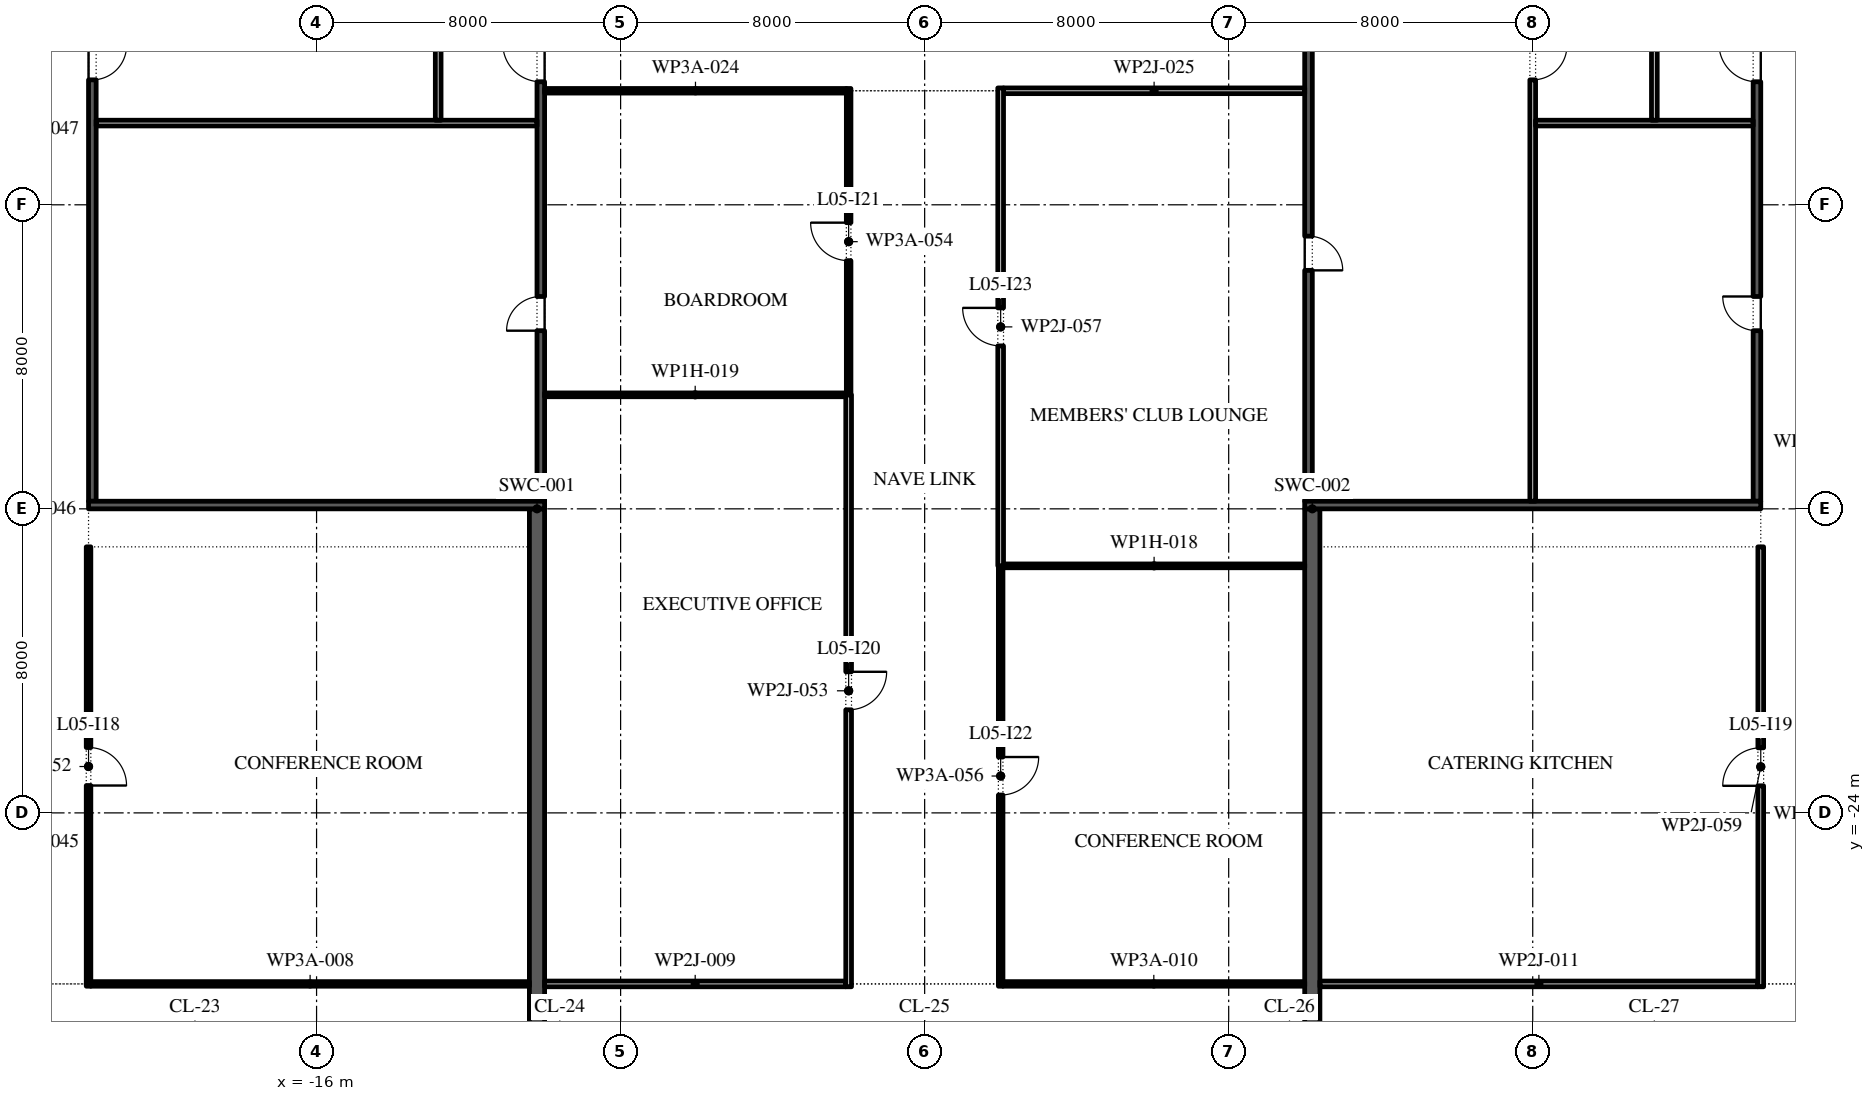
"""IFC4 building model, lengths in metres.
Left out: names, types, materials, properties, quantities, classifications, styles, units other than length and angle.
Written with IfcOpenShell. Run it as: python <this file> out.ifc"""

import sys

from ifc_helpers import new_model, si_unit, direction, frame, frame_2d, origin, place, context, subcontext, project, spatial, rectangle, extrude, element, fill, save


model = new_model("IFC4")
c1 = context("Model", 3, precision=1e-05, world=origin(), true_north=direction((0.0, 1.0)))
c2 = subcontext(c1, "Body", "Model", "MODEL_VIEW")
j1 = project(units=[si_unit("LENGTHUNIT", "METRE"), si_unit("PLANEANGLEUNIT", "RADIAN")], contexts=[c1])
p1 = place(None, origin())
s1 = spatial("IfcSite", under=j1, at=p1, CompositionType="ELEMENT")
p2 = place(p1, origin())
s2 = spatial("IfcBuilding", under=s1, at=p2, CompositionType="ELEMENT")
p3 = place(p2, frame((0.0, 0.0, 28.8)))
s3 = spatial("IfcBuildingStorey", under=s2, at=p3, CompositionType="ELEMENT", Elevation=28.8)
for number, where, z_axis, x_axis in (
    (1, (-10.2, -31.0, 0.0), (0.0, 0.0, 1.0), (0.0, 1.0, 0.0)),
    (2, (10.2, -31.0, 0.0), (0.0, 0.0, 1.0), (0.0, 1.0, 0.0)),
):
    element("IfcWall", number, at=place(p3, frame(where, z_axis=z_axis, x_axis=x_axis)), inside=s3, PredefinedType="SHEAR", context=c2, shape_type="SweptSolid", body=[
        extrude(rectangle(XDim=15.0, YDim=0.4, at=frame_2d((7.5, 0.0))), origin(), (0.0, 0.0, 1.0), 4.35),
    ])
p4 = place(p3, frame((-21.9, -15.8, 0.0), z_axis=(0.0, 0.0, 1.0), x_axis=(0.0, 1.0, 0.0)))
e3 = element("IfcWall", 3, at=p4, inside=s3, PredefinedType="SHEAR", context=c2, shape_type="SweptSolid", body=[
    extrude(rectangle(XDim=13.05, YDim=0.2, at=frame_2d((6.525, 0.0))), origin(), (0.0, 0.0, 1.0), 4.35),
])
p5 = place(p4, frame((11.087, 0.0, 0.0)))
e4 = element("IfcOpeningElement", 4, at=p5, cuts=e3, PredefinedType="OPENING", context=c2, shape_type="SweptSolid", body=[
    extrude(rectangle(XDim=0.9, YDim=2.1, at=frame_2d((0.45, 1.05))), frame((0.0, 0.11, 0.0), z_axis=(0.0, -1.0, 0.0), x_axis=(1.0, 0.0, 0.0)), (0.0, 0.0, 1.0), 0.22),
])
p6 = place(p3, frame((-10.1, -15.8, 0.0), z_axis=(0.0, 0.0, 1.0), x_axis=(0.0, 1.0, 0.0)))
e5 = element("IfcWall", 5, at=p6, inside=s3, PredefinedType="SHEAR", context=c2, shape_type="SweptSolid", body=[
    extrude(rectangle(XDim=13.05, YDim=0.2, at=frame_2d((6.525, 0.0))), origin(), (0.0, 0.0, 1.0), 4.35),
])
p7 = place(p6, frame((4.488, 0.0, 0.0)))
e6 = element("IfcOpeningElement", 6, at=p7, cuts=e5, PredefinedType="OPENING", context=c2, shape_type="SweptSolid", body=[
    extrude(rectangle(XDim=0.9, YDim=2.1, at=frame_2d((0.45, 1.05))), frame((0.0, 0.11, 0.0), z_axis=(0.0, -1.0, 0.0), x_axis=(1.0, 0.0, 0.0)), (0.0, 0.0, 1.0), 0.22),
])
p8 = place(p6, frame((11.038, 0.0, 0.0)))
e7 = element("IfcOpeningElement", 7, at=p8, cuts=e5, PredefinedType="OPENING", context=c2, shape_type="SweptSolid", body=[
    extrude(rectangle(XDim=1.0, YDim=2.1, at=frame_2d((0.5, 1.05))), frame((0.0, 0.11, 0.0), z_axis=(0.0, -1.0, 0.0), x_axis=(1.0, 0.0, 0.0)), (0.0, 0.0, 1.0), 0.22),
])
p9 = place(p3, frame((-22.0, -15.9, 0.0), z_axis=(0.0, 0.0, 1.0), x_axis=(1.0, 0.0, 0.0)))
e8 = element("IfcWall", 8, at=p9, inside=s3, PredefinedType="SHEAR", context=c2, shape_type="SweptSolid", body=[
    extrude(rectangle(XDim=12.0, YDim=0.2, at=frame_2d((6.0, 0.0))), origin(), (0.0, 0.0, 1.0), 4.35),
])
p10 = place(p3, frame((-21.8, -5.85, 0.0), z_axis=(0.0, 0.0, 1.0), x_axis=(1.0, 0.0, 0.0)))
e9 = element("IfcWall", 9, at=p10, inside=s3, PredefinedType="PARTITIONING", context=c2, shape_type="SweptSolid", body=[
    extrude(rectangle(XDim=11.6, YDim=0.15, at=frame_2d((5.8, 0.0))), origin(), (0.0, 0.0, 1.0), 4.35),
])
p11 = place(p3, frame((-12.8, -5.775, 0.0), z_axis=(0.0, 0.0, 1.0), x_axis=(0.0, 1.0, 0.0)))
e10 = element("IfcWall", 10, at=p11, inside=s3, PredefinedType="PARTITIONING", context=c2, shape_type="SweptSolid", body=[
    extrude(rectangle(XDim=3.025, YDim=0.15, at=frame_2d((1.512, 0.0))), origin(), (0.0, 0.0, 1.0), 4.35),
])
p12 = place(p3, frame((21.9, -15.8, 0.0), z_axis=(0.0, 0.0, 1.0), x_axis=(0.0, 1.0, 0.0)))
e11 = element("IfcWall", 11, at=p12, inside=s3, PredefinedType="SHEAR", context=c2, shape_type="SweptSolid", body=[
    extrude(rectangle(XDim=13.05, YDim=0.2, at=frame_2d((6.525, 0.0))), origin(), (0.0, 0.0, 1.0), 4.35),
])
p13 = place(p12, frame((4.488, 0.0, 0.0)))
e12 = element("IfcOpeningElement", 12, at=p13, cuts=e11, PredefinedType="OPENING", context=c2, shape_type="SweptSolid", body=[
    extrude(rectangle(XDim=0.9, YDim=2.1, at=frame_2d((0.45, 1.05))), frame((0.0, 0.11, 0.0), z_axis=(0.0, -1.0, 0.0), x_axis=(1.0, 0.0, 0.0)), (0.0, 0.0, 1.0), 0.22),
])
p14 = place(p12, frame((11.038, 0.0, 0.0)))
e13 = element("IfcOpeningElement", 13, at=p14, cuts=e11, PredefinedType="OPENING", context=c2, shape_type="SweptSolid", body=[
    extrude(rectangle(XDim=1.0, YDim=2.1, at=frame_2d((0.5, 1.05))), frame((0.0, 0.11, 0.0), z_axis=(0.0, -1.0, 0.0), x_axis=(1.0, 0.0, 0.0)), (0.0, 0.0, 1.0), 0.22),
])
p15 = place(p3, frame((10.1, -15.8, 0.0), z_axis=(0.0, 0.0, 1.0), x_axis=(0.0, 1.0, 0.0)))
e14 = element("IfcWall", 14, at=p15, inside=s3, PredefinedType="SHEAR", context=c2, shape_type="SweptSolid", body=[
    extrude(rectangle(XDim=13.05, YDim=0.2, at=frame_2d((6.525, 0.0))), origin(), (0.0, 0.0, 1.0), 4.35),
])
p16 = place(p15, frame((6.075, 0.0, 0.0)))
e15 = element("IfcOpeningElement", 15, at=p16, cuts=e14, PredefinedType="OPENING", context=c2, shape_type="SweptSolid", body=[
    extrude(rectangle(XDim=0.9, YDim=2.1, at=frame_2d((0.45, 1.05))), frame((0.0, 0.11, 0.0), z_axis=(0.0, -1.0, 0.0), x_axis=(1.0, 0.0, 0.0)), (0.0, 0.0, 1.0), 0.22),
])
p17 = place(p3, frame((10.0, -15.9, 0.0), z_axis=(0.0, 0.0, 1.0), x_axis=(1.0, 0.0, 0.0)))
e16 = element("IfcWall", 16, at=p17, inside=s3, PredefinedType="SHEAR", context=c2, shape_type="SweptSolid", body=[
    extrude(rectangle(XDim=12.0, YDim=0.2, at=frame_2d((6.0, 0.0))), origin(), (0.0, 0.0, 1.0), 4.35),
])
p18 = place(p3, frame((16.0, -15.8, 0.0), z_axis=(0.0, 0.0, 1.0), x_axis=(0.0, 1.0, 0.0)))
e17 = element("IfcWall", 17, at=p18, inside=s3, PredefinedType="PARTITIONING", context=c2, shape_type="SweptSolid", body=[
    extrude(rectangle(XDim=13.05, YDim=0.15, at=frame_2d((6.525, 0.0))), origin(), (0.0, 0.0, 1.0), 4.35),
])
p19 = place(p18, frame((11.087, 0.0, 0.0)))
e18 = element("IfcOpeningElement", 18, at=p19, cuts=e17, PredefinedType="OPENING", context=c2, shape_type="SweptSolid", body=[
    extrude(rectangle(XDim=0.9, YDim=2.1, at=frame_2d((0.45, 1.05))), frame((0.0, 0.085, 0.0), z_axis=(0.0, -1.0, 0.0), x_axis=(1.0, 0.0, 0.0)), (0.0, 0.0, 1.0), 0.17),
])
p20 = place(p3, frame((16.075, -5.85, 0.0), z_axis=(0.0, 0.0, 1.0), x_axis=(1.0, 0.0, 0.0)))
e19 = element("IfcWall", 19, at=p20, inside=s3, PredefinedType="PARTITIONING", context=c2, shape_type="SweptSolid", body=[
    extrude(rectangle(XDim=5.725, YDim=0.15, at=frame_2d((2.863, 0.0))), origin(), (0.0, 0.0, 1.0), 4.35),
])
p21 = place(p3, frame((19.2, -5.775, 0.0), z_axis=(0.0, 0.0, 1.0), x_axis=(0.0, 1.0, 0.0)))
e20 = element("IfcWall", 20, at=p21, inside=s3, PredefinedType="PARTITIONING", context=c2, shape_type="SweptSolid", body=[
    extrude(rectangle(XDim=3.025, YDim=0.15, at=frame_2d((1.512, 0.0))), origin(), (0.0, 0.0, 1.0), 4.35),
])
p22 = place(p3, frame((-21.94, -28.5, 0.0), z_axis=(0.0, 0.0, 1.0), x_axis=(1.0, 0.0, 0.0)))
e21 = element("IfcWall", 21, at=p22, inside=s3, PredefinedType="PARTITIONING", context=c2, shape_type="SweptSolid", body=[
    extrude(rectangle(XDim=11.54, YDim=0.12, at=frame_2d((5.77, 0.0))), origin(), (0.0, 0.0, 1.0), 4.35),
])
p23 = place(p3, frame((-10.0, -28.5, 0.0), z_axis=(0.0, 0.0, 1.0), x_axis=(1.0, 0.0, 0.0)))
e22 = element("IfcWall", 22, at=p23, inside=s3, PredefinedType="PARTITIONING", context=c2, shape_type="SweptSolid", body=[
    extrude(rectangle(XDim=7.925, YDim=0.15, at=frame_2d((3.962, 0.0))), origin(), (0.0, 0.0, 1.0), 4.35),
])
p24 = place(p3, frame((2.06, -28.5, 0.0), z_axis=(0.0, 0.0, 1.0), x_axis=(1.0, 0.0, 0.0)))
e23 = element("IfcWall", 23, at=p24, inside=s3, PredefinedType="PARTITIONING", context=c2, shape_type="SweptSolid", body=[
    extrude(rectangle(XDim=7.94, YDim=0.12, at=frame_2d((3.97, 0.0))), origin(), (0.0, 0.0, 1.0), 4.35),
])
p25 = place(p3, frame((10.4, -28.5, 0.0), z_axis=(0.0, 0.0, 1.0), x_axis=(1.0, 0.0, 0.0)))
e24 = element("IfcWall", 24, at=p25, inside=s3, PredefinedType="PARTITIONING", context=c2, shape_type="SweptSolid", body=[
    extrude(rectangle(XDim=11.525, YDim=0.15, at=frame_2d((5.763, 0.0))), origin(), (0.0, 0.0, 1.0), 4.35),
])
for number, where, z_axis, x_axis in (
    (25, (2.075, -17.5, 0.0), (0.0, 0.0, 1.0), (1.0, 0.0, 0.0)),
    (26, (-10.0, -13.0, 0.0), (0.0, 0.0, 1.0), (1.0, 0.0, 0.0)),
):
    element("IfcWall", number, at=place(p3, frame(where, z_axis=z_axis, x_axis=x_axis)), inside=s3, PredefinedType="PARTITIONING", context=c2, shape_type="SweptSolid", body=[
        extrude(rectangle(XDim=7.925, YDim=0.1, at=frame_2d((3.962, 0.0))), origin(), (0.0, 0.0, 1.0), 4.35),
    ])
p26 = place(p3, frame((-10.0, -5.0, 0.0), z_axis=(0.0, 0.0, 1.0), x_axis=(1.0, 0.0, 0.0)))
e27 = element("IfcWall", 27, at=p26, inside=s3, PredefinedType="PARTITIONING", context=c2, shape_type="SweptSolid", body=[
    extrude(rectangle(XDim=7.94, YDim=0.12, at=frame_2d((3.97, 0.0))), origin(), (0.0, 0.0, 1.0), 4.35),
])
p27 = place(p3, frame((2.075, -5.0, 0.0), z_axis=(0.0, 0.0, 1.0), x_axis=(1.0, 0.0, 0.0)))
e28 = element("IfcWall", 28, at=p27, inside=s3, PredefinedType="PARTITIONING", context=c2, shape_type="SweptSolid", body=[
    extrude(rectangle(XDim=7.925, YDim=0.15, at=frame_2d((3.962, 0.0))), origin(), (0.0, 0.0, 1.0), 4.35),
])
p28 = place(p3, frame((-22.0, -28.56, 0.0), z_axis=(0.0, 0.0, 1.0), x_axis=(0.0, 1.0, 0.0)))
e29 = element("IfcWall", 29, at=p28, inside=s3, PredefinedType="PARTITIONING", context=c2, shape_type="SweptSolid", body=[
    extrude(rectangle(XDim=11.56, YDim=0.12, at=frame_2d((5.78, 0.0))), origin(), (0.0, 0.0, 1.0), 4.35),
])
p29 = place(p28, frame((5.28, 0.0, 0.0)))
e30 = element("IfcOpeningElement", 30, at=p29, cuts=e29, PredefinedType="OPENING", context=c2, shape_type="SweptSolid", body=[
    extrude(rectangle(XDim=1.0, YDim=2.1, at=frame_2d((0.5, 1.05))), frame((0.0, 0.07, 0.0), z_axis=(0.0, -1.0, 0.0), x_axis=(1.0, 0.0, 0.0)), (0.0, 0.0, 1.0), 0.14),
])
p30 = place(p3, frame((-2.0, -28.575, 0.0), z_axis=(0.0, 0.0, 1.0), x_axis=(0.0, 1.0, 0.0)))
e31 = element("IfcWall", 31, at=p30, inside=s3, PredefinedType="PARTITIONING", context=c2, shape_type="SweptSolid", body=[
    extrude(rectangle(XDim=15.575, YDim=0.15, at=frame_2d((7.788, 0.0))), origin(), (0.0, 0.0, 1.0), 4.35),
])
p31 = place(p30, frame((7.288, 0.0, 0.0)))
e32 = element("IfcOpeningElement", 32, at=p31, cuts=e31, PredefinedType="OPENING", context=c2, shape_type="SweptSolid", body=[
    extrude(rectangle(XDim=1.0, YDim=2.1, at=frame_2d((0.5, 1.05))), frame((0.0, 0.085, 0.0), z_axis=(0.0, -1.0, 0.0), x_axis=(1.0, 0.0, 0.0)), (0.0, 0.0, 1.0), 0.17),
])
p32 = place(p3, frame((-2.0, -13.0, 0.0), z_axis=(0.0, 0.0, 1.0), x_axis=(0.0, 1.0, 0.0)))
e33 = element("IfcWall", 33, at=p32, inside=s3, PredefinedType="PARTITIONING", context=c2, shape_type="SweptSolid", body=[
    extrude(rectangle(XDim=8.06, YDim=0.12, at=frame_2d((4.03, 0.0))), origin(), (0.0, 0.0, 1.0), 4.35),
])
p33 = place(p32, frame((3.53, 0.0, 0.0)))
e34 = element("IfcOpeningElement", 34, at=p33, cuts=e33, PredefinedType="OPENING", context=c2, shape_type="SweptSolid", body=[
    extrude(rectangle(XDim=1.0, YDim=2.1, at=frame_2d((0.5, 1.05))), frame((0.0, 0.07, 0.0), z_axis=(0.0, -1.0, 0.0), x_axis=(1.0, 0.0, 0.0)), (0.0, 0.0, 1.0), 0.14),
])
p34 = place(p3, frame((2.0, -28.56, 0.0), z_axis=(0.0, 0.0, 1.0), x_axis=(0.0, 1.0, 0.0)))
e35 = element("IfcWall", 35, at=p34, inside=s3, PredefinedType="PARTITIONING", context=c2, shape_type="SweptSolid", body=[
    extrude(rectangle(XDim=11.06, YDim=0.12, at=frame_2d((5.53, 0.0))), origin(), (0.0, 0.0, 1.0), 4.35),
])
p35 = place(p34, frame((5.03, 0.0, 0.0)))
e36 = element("IfcOpeningElement", 36, at=p35, cuts=e35, PredefinedType="OPENING", context=c2, shape_type="SweptSolid", body=[
    extrude(rectangle(XDim=1.0, YDim=2.1, at=frame_2d((0.5, 1.05))), frame((0.0, 0.07, 0.0), z_axis=(0.0, -1.0, 0.0), x_axis=(1.0, 0.0, 0.0)), (0.0, 0.0, 1.0), 0.14),
])
p36 = place(p3, frame((2.0, -17.5, 0.0), z_axis=(0.0, 0.0, 1.0), x_axis=(0.0, 1.0, 0.0)))
e37 = element("IfcWall", 37, at=p36, inside=s3, PredefinedType="PARTITIONING", context=c2, shape_type="SweptSolid", body=[
    extrude(rectangle(XDim=12.575, YDim=0.15, at=frame_2d((6.288, 0.0))), origin(), (0.0, 0.0, 1.0), 4.35),
])
p37 = place(p36, frame((5.788, 0.0, 0.0)))
e38 = element("IfcOpeningElement", 38, at=p37, cuts=e37, PredefinedType="OPENING", context=c2, shape_type="SweptSolid", body=[
    extrude(rectangle(XDim=1.0, YDim=2.1, at=frame_2d((0.5, 1.05))), frame((0.0, 0.085, 0.0), z_axis=(0.0, -1.0, 0.0), x_axis=(1.0, 0.0, 0.0)), (0.0, 0.0, 1.0), 0.17),
])
p38 = place(p3, frame((22.0, -28.575, 0.0), z_axis=(0.0, 0.0, 1.0), x_axis=(0.0, 1.0, 0.0)))
e39 = element("IfcWall", 39, at=p38, inside=s3, PredefinedType="PARTITIONING", context=c2, shape_type="SweptSolid", body=[
    extrude(rectangle(XDim=11.575, YDim=0.15, at=frame_2d((5.788, 0.0))), origin(), (0.0, 0.0, 1.0), 4.35),
])
p39 = place(p38, frame((5.288, 0.0, 0.0)))
e40 = element("IfcOpeningElement", 40, at=p39, cuts=e39, PredefinedType="OPENING", context=c2, shape_type="SweptSolid", body=[
    extrude(rectangle(XDim=1.0, YDim=2.1, at=frame_2d((0.5, 1.05))), frame((0.0, 0.085, 0.0), z_axis=(0.0, -1.0, 0.0), x_axis=(1.0, 0.0, 0.0)), (0.0, 0.0, 1.0), 0.17),
])
p40 = place(p7, origin())
e41 = element("IfcDoor", 41, at=p40, inside=s3, OperationType="SINGLE_SWING_RIGHT", PredefinedType="DOOR", context=c2, shape_type="SweptSolid", body=[
    extrude(rectangle(XDim=0.9, YDim=2.1, at=frame_2d((0.45, 1.05))), frame((0.0, 0.1, 0.0), z_axis=(0.0, -1.0, 0.0), x_axis=(1.0, 0.0, 0.0)), (0.0, 0.0, 1.0), 0.05),
])
fill(e6, e41)
p41 = place(p8, origin())
e42 = element("IfcDoor", 42, at=p41, inside=s3, OperationType="SINGLE_SWING_LEFT", PredefinedType="DOOR", context=c2, shape_type="SweptSolid", body=[
    extrude(rectangle(XDim=1.0, YDim=2.1, at=frame_2d((0.5, 1.05))), frame((0.0, 0.1, 0.0), z_axis=(0.0, -1.0, 0.0), x_axis=(1.0, 0.0, 0.0)), (0.0, 0.0, 1.0), 0.05),
])
fill(e7, e42)
p42 = place(p5, frame((0.9, -0.15, 0.0), z_axis=(0.0, 0.0, 1.0), x_axis=(-1.0, 0.0, 0.0)))
e43 = element("IfcDoor", 43, at=p42, inside=s3, OperationType="SINGLE_SWING_RIGHT", PredefinedType="DOOR", context=c2, shape_type="SweptSolid", body=[
    extrude(rectangle(XDim=0.9, YDim=2.1, at=frame_2d((0.45, 1.05))), frame((0.0, -0.05, 0.0), z_axis=(0.0, -1.0, 0.0), x_axis=(1.0, 0.0, 0.0)), (0.0, 0.0, 1.0), 0.05),
])
fill(e4, e43)
p43 = place(p13, origin())
e44 = element("IfcDoor", 44, at=p43, inside=s3, OperationType="SINGLE_SWING_LEFT", PredefinedType="DOOR", context=c2, shape_type="SweptSolid", body=[
    extrude(rectangle(XDim=0.9, YDim=2.1, at=frame_2d((0.45, 1.05))), frame((0.0, 0.1, 0.0), z_axis=(0.0, -1.0, 0.0), x_axis=(1.0, 0.0, 0.0)), (0.0, 0.0, 1.0), 0.05),
])
fill(e12, e44)
p44 = place(p14, origin())
e45 = element("IfcDoor", 45, at=p44, inside=s3, OperationType="SINGLE_SWING_LEFT", PredefinedType="DOOR", context=c2, shape_type="SweptSolid", body=[
    extrude(rectangle(XDim=1.0, YDim=2.1, at=frame_2d((0.5, 1.05))), frame((0.0, 0.1, 0.0), z_axis=(0.0, -1.0, 0.0), x_axis=(1.0, 0.0, 0.0)), (0.0, 0.0, 1.0), 0.05),
])
fill(e13, e45)
p45 = place(p19, frame((0.9, 0.0, 0.0), z_axis=(0.0, 0.0, 1.0), x_axis=(-1.0, 0.0, 0.0)))
e46 = element("IfcDoor", 46, at=p45, inside=s3, OperationType="SINGLE_SWING_RIGHT", PredefinedType="DOOR", context=c2, shape_type="SweptSolid", body=[
    extrude(rectangle(XDim=0.9, YDim=2.1, at=frame_2d((0.45, 1.05))), frame((0.0, 0.025, 0.0), z_axis=(0.0, -1.0, 0.0), x_axis=(1.0, 0.0, 0.0)), (0.0, 0.0, 1.0), 0.05),
])
fill(e18, e46)
p46 = place(p16, frame((0.9, -0.15, 0.0), z_axis=(0.0, 0.0, 1.0), x_axis=(-1.0, 0.0, 0.0)))
e47 = element("IfcDoor", 47, at=p46, inside=s3, OperationType="SINGLE_SWING_LEFT", PredefinedType="DOOR", context=c2, shape_type="SweptSolid", body=[
    extrude(rectangle(XDim=0.9, YDim=2.1, at=frame_2d((0.45, 1.05))), frame((0.0, -0.05, 0.0), z_axis=(0.0, -1.0, 0.0), x_axis=(1.0, 0.0, 0.0)), (0.0, 0.0, 1.0), 0.05),
])
fill(e15, e47)
p47 = place(p29, frame((1.0, 0.0, 0.0), z_axis=(0.0, 0.0, 1.0), x_axis=(-1.0, 0.0, 0.0)))
e48 = element("IfcDoor", 48, at=p47, inside=s3, OperationType="SINGLE_SWING_LEFT", PredefinedType="DOOR", context=c2, shape_type="SweptSolid", body=[
    extrude(rectangle(XDim=1.0, YDim=2.1, at=frame_2d((0.5, 1.05))), frame((0.0, 0.025, 0.0), z_axis=(0.0, -1.0, 0.0), x_axis=(1.0, 0.0, 0.0)), (0.0, 0.0, 1.0), 0.05),
])
fill(e30, e48)
p48 = place(p39, origin())
e49 = element("IfcDoor", 49, at=p48, inside=s3, OperationType="SINGLE_SWING_RIGHT", PredefinedType="DOOR", context=c2, shape_type="SweptSolid", body=[
    extrude(rectangle(XDim=1.0, YDim=2.1, at=frame_2d((0.5, 1.05))), frame((0.0, 0.025, 0.0), z_axis=(0.0, -1.0, 0.0), x_axis=(1.0, 0.0, 0.0)), (0.0, 0.0, 1.0), 0.05),
])
fill(e40, e49)
p49 = place(p31, frame((1.0, 0.0, 0.0), z_axis=(0.0, 0.0, 1.0), x_axis=(-1.0, 0.0, 0.0)))
e50 = element("IfcDoor", 50, at=p49, inside=s3, OperationType="SINGLE_SWING_RIGHT", PredefinedType="DOOR", context=c2, shape_type="SweptSolid", body=[
    extrude(rectangle(XDim=1.0, YDim=2.1, at=frame_2d((0.5, 1.05))), frame((0.0, 0.025, 0.0), z_axis=(0.0, -1.0, 0.0), x_axis=(1.0, 0.0, 0.0)), (0.0, 0.0, 1.0), 0.05),
])
fill(e32, e50)
p50 = place(p33, origin())
e51 = element("IfcDoor", 51, at=p50, inside=s3, OperationType="SINGLE_SWING_LEFT", PredefinedType="DOOR", context=c2, shape_type="SweptSolid", body=[
    extrude(rectangle(XDim=1.0, YDim=2.1, at=frame_2d((0.5, 1.05))), frame((0.0, 0.025, 0.0), z_axis=(0.0, -1.0, 0.0), x_axis=(1.0, 0.0, 0.0)), (0.0, 0.0, 1.0), 0.05),
])
fill(e34, e51)
p51 = place(p35, frame((1.0, 0.0, 0.0), z_axis=(0.0, 0.0, 1.0), x_axis=(-1.0, 0.0, 0.0)))
e52 = element("IfcDoor", 52, at=p51, inside=s3, OperationType="SINGLE_SWING_RIGHT", PredefinedType="DOOR", context=c2, shape_type="SweptSolid", body=[
    extrude(rectangle(XDim=1.0, YDim=2.1, at=frame_2d((0.5, 1.05))), frame((0.0, 0.025, 0.0), z_axis=(0.0, -1.0, 0.0), x_axis=(1.0, 0.0, 0.0)), (0.0, 0.0, 1.0), 0.05),
])
fill(e36, e52)
p52 = place(p37, origin())
e53 = element("IfcDoor", 53, at=p52, inside=s3, OperationType="SINGLE_SWING_LEFT", PredefinedType="DOOR", context=c2, shape_type="SweptSolid", body=[
    extrude(rectangle(XDim=1.0, YDim=2.1, at=frame_2d((0.5, 1.05))), frame((0.0, 0.025, 0.0), z_axis=(0.0, -1.0, 0.0), x_axis=(1.0, 0.0, 0.0)), (0.0, 0.0, 1.0), 0.05),
])
fill(e38, e53)
save(model, sys.argv[1])
